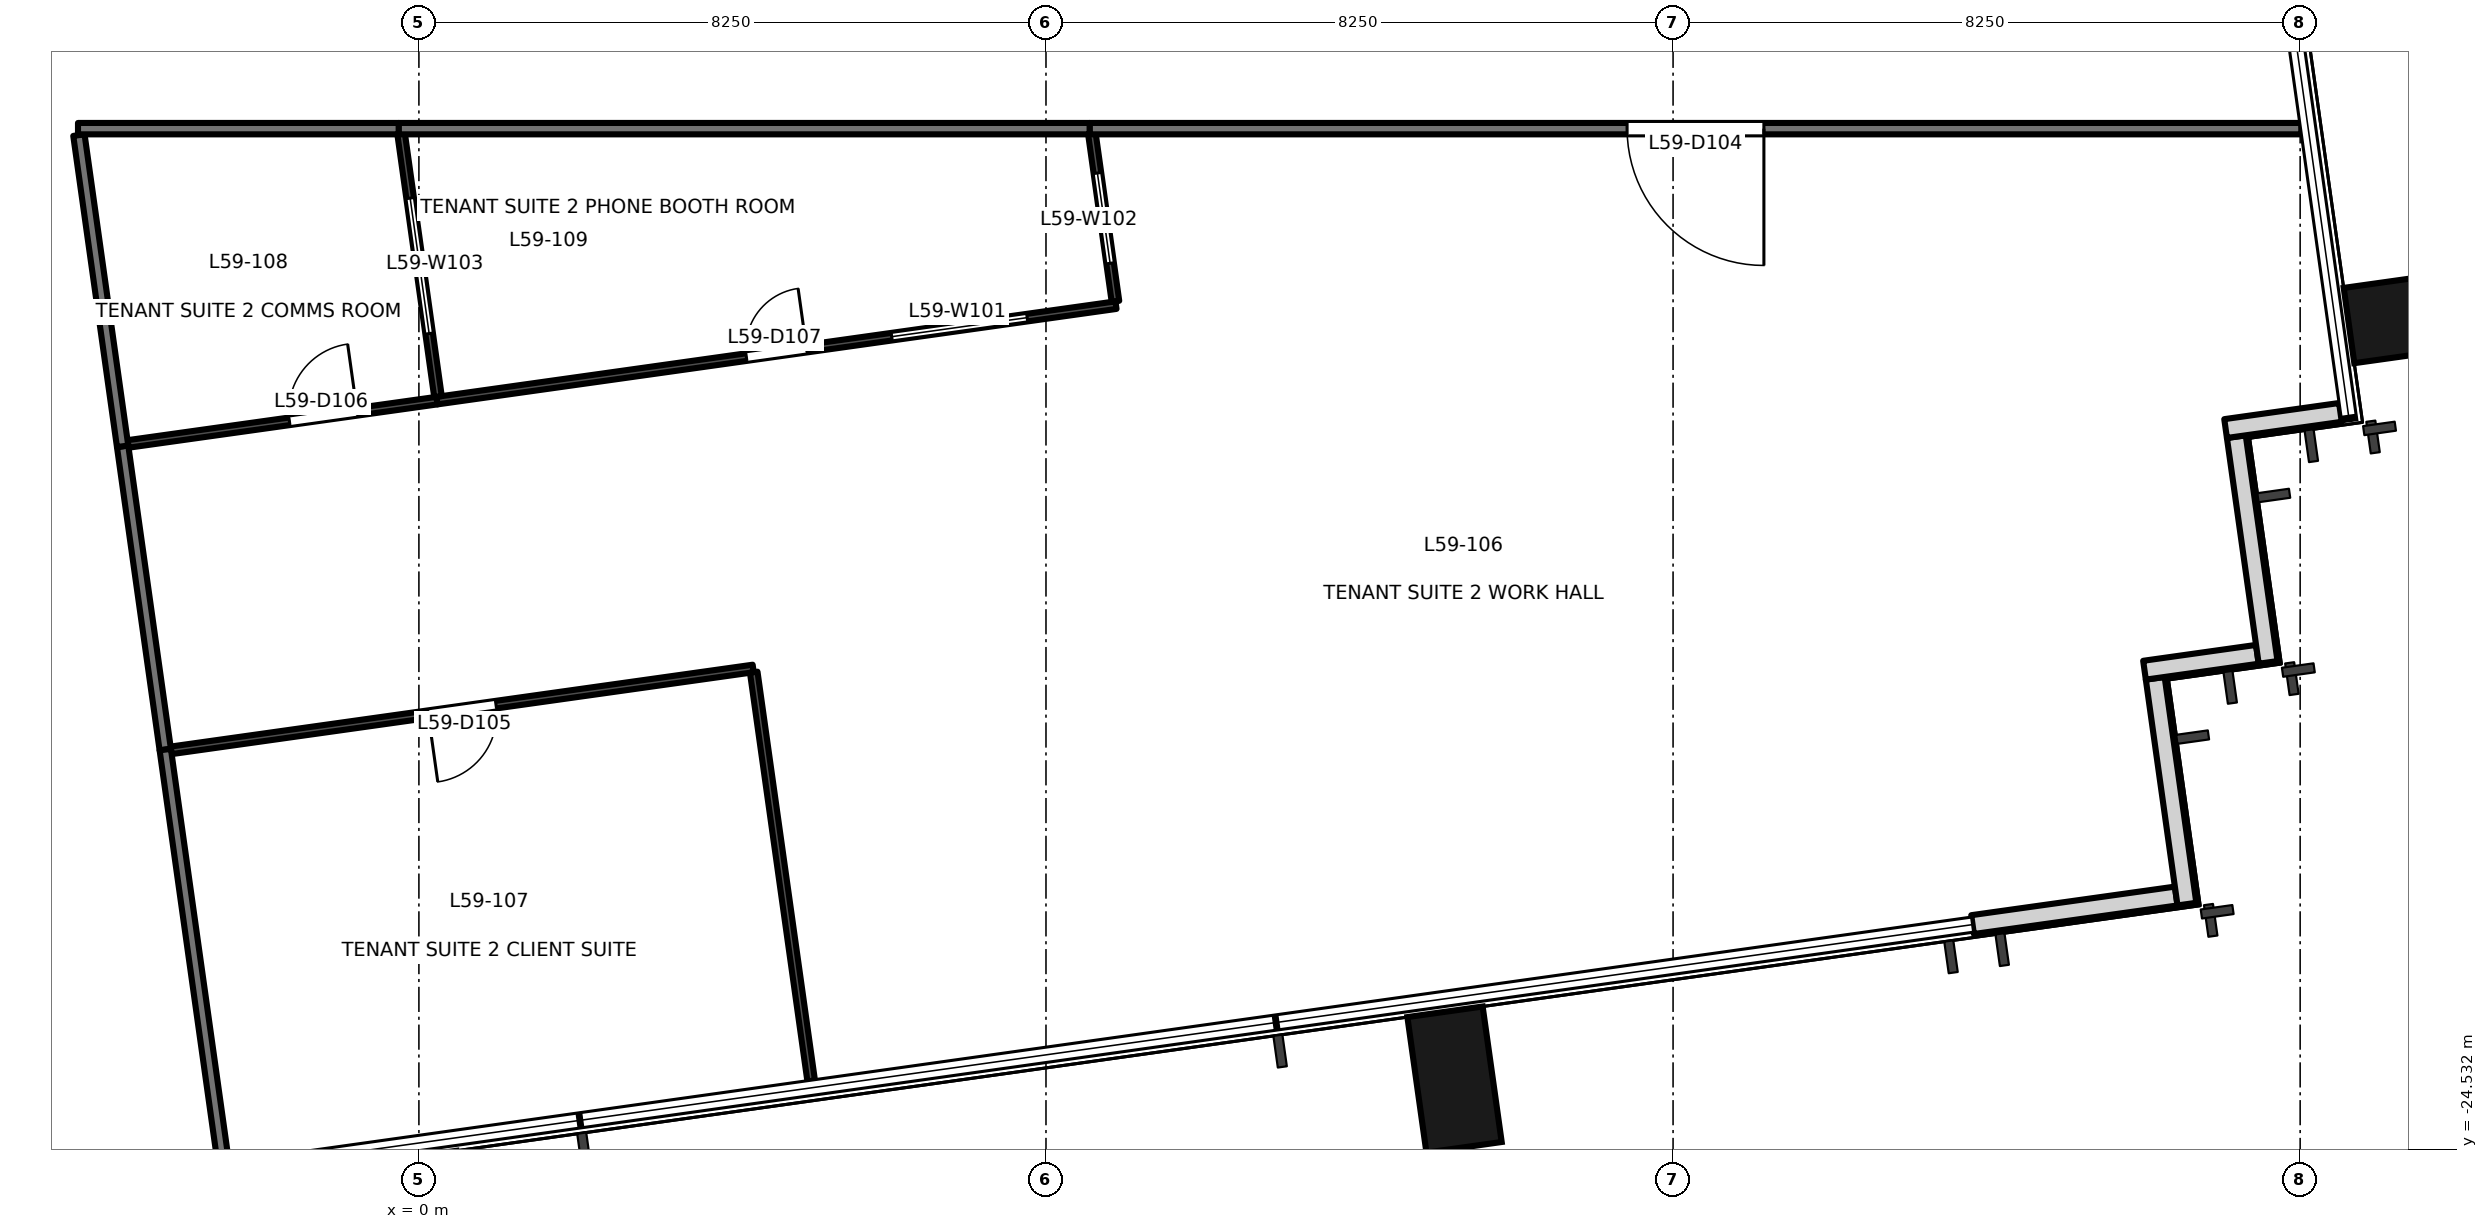
"""IFC4 building model, lengths in metres.
Left out: names, types, materials, properties, quantities, classifications, styles, units other than length and angle.
Written with IfcOpenShell. Run it as: python <this file> out.ifc"""

import sys

from ifc_helpers import new_model, si_unit, direction, frame, frame_2d, origin, origin_2d, place, context, subcontext, project, spatial, rectangle, extrude, element, fill, save


model = new_model("IFC4")
c1 = context("Model", 3, precision=1e-05, world=origin(), true_north=direction((0.0, 1.0)))
c2 = subcontext(c1, "Body", "Model", "MODEL_VIEW")
j1 = project(units=[si_unit("LENGTHUNIT", "METRE"), si_unit("PLANEANGLEUNIT", "RADIAN")], contexts=[c1])
p1 = place(None, origin())
s1 = spatial("IfcSite", under=j1, at=p1, CompositionType="ELEMENT")
p2 = place(p1, origin())
s2 = spatial("IfcBuilding", under=s1, at=p2, CompositionType="ELEMENT")
p3 = place(p2, frame((0.0, 0.0, 259.0)))
s3 = spatial("IfcBuildingStorey", under=s2, at=p3, CompositionType="ELEMENT", Elevation=259.0)
for number, where, z_axis, x_axis in (
    (1, (13.625, -23.61, -0.2), (0.0, 0.0, 1.0), (0.99, 0.139, 0.0)),
    (2, (26.284, -13.565, -0.2), (0.0, 0.0, 1.0), (-0.139, 0.99, 0.0)),
):
    element("IfcColumn", number, at=place(p3, frame(where, z_axis=z_axis, x_axis=x_axis)), inside=s3, PredefinedType="COLUMN", context=c2, shape_type="SweptSolid", body=[
        extrude(rectangle(XDim=1.0, YDim=1.8, at=origin_2d()), origin(), (0.0, 0.0, 1.0), 3.9),
    ])
p4 = place(p3, frame((20.44, -21.572, 0.0), z_axis=(0.0, 0.0, 1.0), x_axis=(0.990293105353, 0.138994839796, 0.0)))
e3 = element("IfcWall", 3, at=p4, inside=s3, PredefinedType="SOLIDWALL", context=c2, shape_type="SweptSolid", body=[
    extrude(rectangle(XDim=2.705, YDim=0.25, at=frame_2d((1.353, 0.0))), origin(), (0.0, 0.0, 1.0), 3.7),
])
p5 = place(p3, frame((23.26, -21.302, 0.0), z_axis=(0.0, 0.0, 1.0), x_axis=(-0.138994228812, 0.990293191109, 0.0)))
e4 = element("IfcWall", 4, at=p5, inside=s3, PredefinedType="SOLIDWALL", context=c2, shape_type="SweptSolid", body=[
    extrude(rectangle(XDim=3.0, YDim=0.25, at=frame_2d((1.5, 0.0))), origin(), (0.0, 0.0, 1.0), 3.7),
])
p6 = place(p3, frame((22.702, -18.225, 0.0), z_axis=(0.0, 0.0, 1.0), x_axis=(0.990243596651, 0.13934711799, 0.0)))
e5 = element("IfcWall", 5, at=p6, inside=s3, PredefinedType="SOLIDWALL", context=c2, shape_type="SweptSolid", body=[
    extrude(rectangle(XDim=1.5, YDim=0.25, at=frame_2d((0.75, 0.0))), origin(), (0.0, 0.0, 1.0), 3.7),
])
p7 = place(p3, frame((24.328, -18.122, 0.0), z_axis=(0.0, 0.0, 1.0), x_axis=(-0.139358350296, 0.990242015975, 0.0)))
e6 = element("IfcWall", 6, at=p7, inside=s3, PredefinedType="SOLIDWALL", context=c2, shape_type="SweptSolid", body=[
    extrude(rectangle(XDim=2.999, YDim=0.25, at=frame_2d((1.5, 0.0))), origin(), (0.0, 0.0, 1.0), 3.7),
])
p8 = place(p3, frame((23.769, -15.046, 0.0), z_axis=(0.0, 0.0, 1.0), x_axis=(0.990260716096, 0.139225407725, 0.0)))
e7 = element("IfcWall", 7, at=p8, inside=s3, PredefinedType="SOLIDWALL", context=c2, shape_type="SweptSolid", body=[
    extrude(rectangle(XDim=1.526, YDim=0.25, at=frame_2d((0.763, 0.0))), origin(), (0.0, 0.0, 1.0), 3.7),
])
p9 = place(p3, frame((-3.898, -15.279, 0.0), z_axis=(0.0, 0.0, 1.0), x_axis=(0.139240905476, -0.990258537071, 0.0)))
e8 = element("IfcWall", 8, at=p9, inside=s3, PredefinedType="PARTITIONING", context=c2, shape_type="SweptSolid", body=[
    extrude(rectangle(XDim=4.029, YDim=0.15, at=frame_2d((2.015, 0.0))), origin(), (0.0, 0.0, 1.0), 3.7),
])
p10 = place(p3, frame((24.765, -11.1, 0.0), z_axis=(0.0, 0.0, 1.0), x_axis=(-1.0, 0.0, 0.0)))
e9 = element("IfcWall", 9, at=p10, inside=s3, PredefinedType="PARTITIONING", context=c2, shape_type="SweptSolid", body=[
    extrude(rectangle(XDim=15.941, YDim=0.15, at=frame_2d((7.97, 0.0))), origin(), (0.0, 0.0, 1.0), 3.0),
])
p11 = place(p10, frame((7.07, 0.0, 0.0)))
e10 = element("IfcOpeningElement", 10, at=p11, cuts=e9, PredefinedType="OPENING", context=c2, shape_type="SweptSolid", body=[
    extrude(rectangle(XDim=1.8, YDim=2.1, at=frame_2d((0.9, 1.05))), frame((0.0, 0.085, 0.0), z_axis=(0.0, -1.0, 0.0), x_axis=(1.0, 0.0, 0.0)), (0.0, 0.0, 1.0), 0.171),
])
p12 = place(p3, frame((-3.337, -19.269, 0.0), z_axis=(0.0, 0.0, 1.0), x_axis=(0.139059647431, -0.990284006968, 0.0)))
e11 = element("IfcWall", 11, at=p12, inside=s3, PredefinedType="PARTITIONING", context=c2, shape_type="SweptSolid", body=[
    extrude(rectangle(XDim=5.5, YDim=0.15, at=frame_2d((2.75, 0.0))), origin(), (0.0, 0.0, 1.0), 3.7),
])
p13 = place(p3, frame((-4.473, -11.185, 0.0), z_axis=(0.0, 0.0, 1.0), x_axis=(0.1390729581, -0.990282137739, 0.0)))
e12 = element("IfcWall", 12, at=p13, inside=s3, PredefinedType="PARTITIONING", context=c2, shape_type="SweptSolid", body=[
    extrude(rectangle(XDim=4.134, YDim=0.15, at=frame_2d((2.067, 0.0))), origin(), (0.0, 0.0, 1.0), 2.8),
])
p14 = place(p3, frame((-0.264, -11.1, 0.0), z_axis=(0.0, 0.0, 1.0), x_axis=(-1.0, 0.0, 0.0)))
e13 = element("IfcWall", 13, at=p14, inside=s3, PredefinedType="PARTITIONING", context=c2, shape_type="SweptSolid", body=[
    extrude(rectangle(XDim=4.221, YDim=0.15, at=frame_2d((2.111, 0.0))), origin(), (0.0, 0.0, 1.0), 2.8),
])
p15 = place(p3, frame((8.824, -11.1, 0.0), z_axis=(0.0, 0.0, 1.0), x_axis=(-1.0, 0.0, 0.0)))
e14 = element("IfcWall", 14, at=p15, inside=s3, PredefinedType="PARTITIONING", context=c2, shape_type="SweptSolid", body=[
    extrude(rectangle(XDim=9.088, YDim=0.15, at=frame_2d((4.544, 0.0))), origin(), (0.0, 0.0, 1.0), 2.9),
])
p16 = place(p3, frame((4.398, -18.202, 0.0), z_axis=(0.0, 0.0, 1.0), x_axis=(-0.990252156894, -0.139286272714, 0.0)))
e15 = element("IfcWall", 15, at=p16, inside=s3, PredefinedType="PARTITIONING", context=c2, shape_type="SweptSolid", body=[
    extrude(rectangle(XDim=7.733, YDim=0.1, at=frame_2d((3.867, 0.0))), origin(), (0.0, 0.0, 1.0), 2.9),
])
p17 = place(p16, frame((3.417, 0.0, 0.0)))
e16 = element("IfcOpeningElement", 16, at=p17, cuts=e15, PredefinedType="OPENING", context=c2, shape_type="SweptSolid", body=[
    extrude(rectangle(XDim=0.9, YDim=2.1, at=frame_2d((0.45, 1.05))), frame((0.0, 0.061, 0.0), z_axis=(0.0, -1.0, 0.0), x_axis=(1.0, 0.0, 0.0)), (0.0, 0.0, 1.0), 0.121),
])
p18 = place(p3, frame((5.161, -23.628, 0.0), z_axis=(0.0, 0.0, 1.0), x_axis=(-0.139205228836, 0.990263552932, 0.0)))
e17 = element("IfcWall", 17, at=p18, inside=s3, PredefinedType="PARTITIONING", context=c2, shape_type="SweptSolid", body=[
    extrude(rectangle(XDim=5.43, YDim=0.1, at=frame_2d((2.715, 0.0))), origin(), (0.0, 0.0, 1.0), 2.9),
])
p19 = place(p3, frame((-3.826, -15.248, 0.0), z_axis=(0.0, 0.0, 1.0), x_axis=(0.990304461309, 0.138913908276, 0.0)))
e18 = element("IfcWall", 18, at=p19, inside=s3, PredefinedType="PARTITIONING", context=c2, shape_type="SweptSolid", body=[
    extrude(rectangle(XDim=4.104, YDim=0.1, at=frame_2d((2.052, 0.0))), origin(), (0.0, 0.0, 1.0), 2.9),
])
p20 = place(p19, frame((2.143, 0.0, 0.0)))
e19 = element("IfcOpeningElement", 19, at=p20, cuts=e18, PredefinedType="OPENING", context=c2, shape_type="SweptSolid", body=[
    extrude(rectangle(XDim=0.9, YDim=2.1, at=frame_2d((0.45, 1.05))), frame((0.0, 0.061, 0.0), z_axis=(0.0, -1.0, 0.0), x_axis=(1.0, 0.0, 0.0)), (0.0, 0.0, 1.0), 0.121),
])
p21 = place(p3, frame((0.238, -14.678, 0.0), z_axis=(0.0, 0.0, 1.0), x_axis=(0.990261534953, 0.139219583367, 0.0)))
e20 = element("IfcWall", 20, at=p21, inside=s3, PredefinedType="PARTITIONING", context=c2, shape_type="SweptSolid", body=[
    extrude(rectangle(XDim=9.021, YDim=0.1, at=frame_2d((4.51, 0.0))), origin(), (0.0, 0.0, 1.0), 2.9),
])
p22 = place(p21, frame((4.11, 0.0, 0.0)))
e21 = element("IfcOpeningElement", 21, at=p22, cuts=e20, PredefinedType="OPENING", context=c2, shape_type="SweptSolid", body=[
    extrude(rectangle(XDim=0.8, YDim=2.1, at=frame_2d((0.4, 1.05))), frame((0.0, 0.061, 0.0), z_axis=(0.0, -1.0, 0.0), x_axis=(1.0, 0.0, 0.0)), (0.0, 0.0, 1.0), 0.121),
])
p23 = place(p21, frame((6.041, 0.0, 0.9)))
e22 = element("IfcOpeningElement", 22, at=p23, cuts=e20, PredefinedType="OPENING", context=c2, shape_type="SweptSolid", body=[
    extrude(rectangle(XDim=1.8, YDim=1.2, at=frame_2d((0.9, 0.6))), frame((0.0, 0.061, 0.0), z_axis=(0.0, -1.0, 0.0), x_axis=(1.0, 0.0, 0.0)), (0.0, 0.0, 1.0), 0.121),
])
p24 = place(p3, frame((9.164, -13.372, 0.0), z_axis=(0.0, 0.0, 1.0), x_axis=(-0.139301888521, 0.99024996029, 0.0)))
e23 = element("IfcWall", 23, at=p24, inside=s3, PredefinedType="PARTITIONING", context=c2, shape_type="SweptSolid", body=[
    extrude(rectangle(XDim=2.226, YDim=0.1, at=frame_2d((1.113, 0.0))), origin(), (0.0, 0.0, 1.0), 3.0),
])
p25 = place(p24, frame((0.505, 0.0, 0.9)))
e24 = element("IfcOpeningElement", 24, at=p25, cuts=e23, PredefinedType="OPENING", context=c2, shape_type="SweptSolid", body=[
    extrude(rectangle(XDim=1.2, YDim=1.2, at=frame_2d((0.6, 0.6))), frame((0.0, 0.061, 0.0), z_axis=(0.0, -1.0, 0.0), x_axis=(1.0, 0.0, 0.0)), (0.0, 0.0, 1.0), 0.121),
])
p26 = place(p3, frame((-0.234, -11.168, 0.0), z_axis=(0.0, 0.0, 1.0), x_axis=(0.138894773338, -0.990307145253, 0.0)))
e25 = element("IfcWall", 25, at=p26, inside=s3, PredefinedType="PARTITIONING", context=c2, shape_type="SweptSolid", body=[
    extrude(rectangle(XDim=3.491, YDim=0.1, at=frame_2d((1.746, 0.0))), origin(), (0.0, 0.0, 1.0), 2.9),
])
p27 = place(p26, frame((0.854, 0.0, 0.9)))
e26 = element("IfcOpeningElement", 26, at=p27, cuts=e25, PredefinedType="OPENING", context=c2, shape_type="SweptSolid", body=[
    extrude(rectangle(XDim=1.8, YDim=1.2, at=frame_2d((0.9, 0.6))), frame((0.0, 0.061, 0.0), z_axis=(0.0, -1.0, 0.0), x_axis=(1.0, 0.0, 0.0)), (0.0, 0.0, 1.0), 0.121),
])
p28 = place(p11, origin())
e27 = element("IfcDoor", 27, at=p28, inside=s3, OperationType="DOUBLE_DOOR_SINGLE_SWING", PredefinedType="DOOR", context=c2, shape_type="SweptSolid", body=[
    extrude(rectangle(XDim=1.8, YDim=2.1, at=frame_2d((0.9, 1.05))), frame((0.0, 0.025, 0.0), z_axis=(0.0, -1.0, 0.0), x_axis=(1.0, 0.0, 0.0)), (0.0, 0.0, 1.0), 0.05),
])
fill(e10, e27)
p29 = place(p17, origin())
e28 = element("IfcDoor", 28, at=p29, inside=s3, OperationType="SINGLE_SWING_RIGHT", PredefinedType="DOOR", context=c2, shape_type="SweptSolid", body=[
    extrude(rectangle(XDim=0.9, YDim=2.1, at=frame_2d((0.45, 1.05))), frame((0.0, 0.025, 0.0), z_axis=(0.0, -1.0, 0.0), x_axis=(1.0, 0.0, 0.0)), (0.0, 0.0, 1.0), 0.05),
])
fill(e16, e28)
p30 = place(p20, origin())
e29 = element("IfcDoor", 29, at=p30, inside=s3, OperationType="SINGLE_SWING_RIGHT", PredefinedType="DOOR", context=c2, shape_type="SweptSolid", body=[
    extrude(rectangle(XDim=0.9, YDim=2.1, at=frame_2d((0.45, 1.05))), frame((0.0, 0.025, 0.0), z_axis=(0.0, -1.0, 0.0), x_axis=(1.0, 0.0, 0.0)), (0.0, 0.0, 1.0), 0.05),
])
fill(e19, e29)
p31 = place(p22, origin())
e30 = element("IfcDoor", 30, at=p31, inside=s3, OperationType="SINGLE_SWING_RIGHT", PredefinedType="DOOR", context=c2, shape_type="SweptSolid", body=[
    extrude(rectangle(XDim=0.8, YDim=2.1, at=frame_2d((0.4, 1.05))), frame((0.0, 0.025, 0.0), z_axis=(0.0, -1.0, 0.0), x_axis=(1.0, 0.0, 0.0)), (0.0, 0.0, 1.0), 0.05),
])
fill(e21, e30)
p32 = place(p23, origin())
e31 = element("IfcWindow", 31, at=p32, inside=s3, PartitioningType="SINGLE_PANEL", PredefinedType="WINDOW", context=c2, shape_type="SweptSolid", body=[
    extrude(rectangle(XDim=1.8, YDim=1.2, at=frame_2d((0.9, 0.6))), frame((0.0, 0.03, 0.0), z_axis=(0.0, -1.0, 0.0), x_axis=(1.0, 0.0, 0.0)), (0.0, 0.0, 1.0), 0.06),
])
fill(e22, e31)
p33 = place(p25, origin())
e32 = element("IfcWindow", 32, at=p33, inside=s3, PartitioningType="SINGLE_PANEL", PredefinedType="WINDOW", context=c2, shape_type="SweptSolid", body=[
    extrude(rectangle(XDim=1.2, YDim=1.2, at=frame_2d((0.6, 0.6))), frame((0.0, 0.03, 0.0), z_axis=(0.0, -1.0, 0.0), x_axis=(1.0, 0.0, 0.0)), (0.0, 0.0, 1.0), 0.06),
])
fill(e24, e32)
p34 = place(p27, origin())
e33 = element("IfcWindow", 33, at=p34, inside=s3, PartitioningType="SINGLE_PANEL", PredefinedType="WINDOW", context=c2, shape_type="SweptSolid", body=[
    extrude(rectangle(XDim=1.8, YDim=1.2, at=frame_2d((0.9, 0.6))), frame((0.0, 0.03, 0.0), z_axis=(0.0, -1.0, 0.0), x_axis=(1.0, 0.0, 0.0)), (0.0, 0.0, 1.0), 0.06),
])
fill(e26, e33)
save(model, sys.argv[1])
